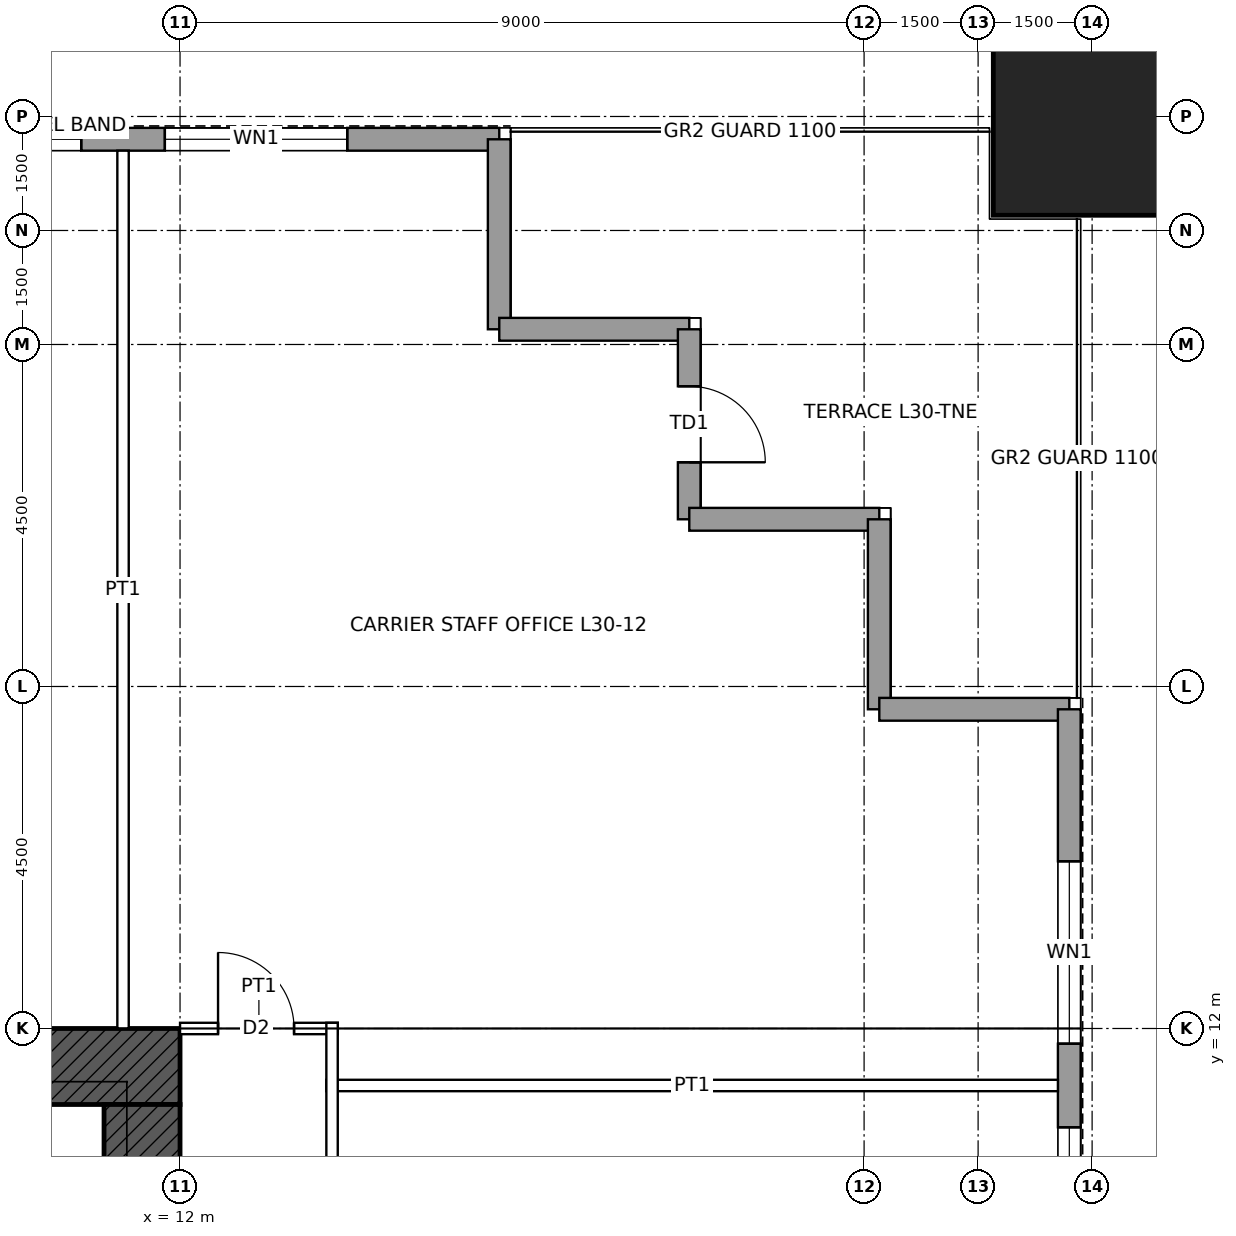
"""IFC4 building model, lengths in metres.
Left out: names, types, materials, properties, quantities, classifications, styles, units other than length and angle.
Written with IfcOpenShell. Run it as: python <this file> out.ifc"""

import sys

from ifc_helpers import new_model, si_unit, direction, frame, frame_2d, origin, origin_2d, place, context, subcontext, project, spatial, rectangle, hollow_rectangle, extrude, element, fill, save


model = new_model("IFC4")
c1 = context("Model", 3, precision=1e-05, world=origin(), true_north=direction((0.0, 1.0)))
c2 = subcontext(c1, "Body", "Model", "MODEL_VIEW")
j1 = project(units=[si_unit("LENGTHUNIT", "METRE"), si_unit("PLANEANGLEUNIT", "RADIAN")], contexts=[c1])
p1 = place(None, origin())
s1 = spatial("IfcSite", under=j1, at=p1, CompositionType="ELEMENT")
p2 = place(p1, origin())
s2 = spatial("IfcBuilding", under=s1, at=p2, CompositionType="ELEMENT")
p3 = place(p2, frame((0.0, 0.0, 149.4)))
s3 = spatial("IfcBuildingStorey", under=s2, at=p3, CompositionType="ELEMENT", Elevation=149.4)
p4 = place(p3, frame((24.0, 24.0, 0.0), z_axis=(0.0, 0.0, 1.0), x_axis=(1.0, 0.0, 0.0)))
e1 = element("IfcColumn", 1, at=p4, inside=s3, PredefinedType="COLUMN", context=c2, shape_type="SweptSolid", body=[
    extrude(hollow_rectangle(XDim=2.6, YDim=2.6, WallThickness=0.13, at=origin_2d()), origin(), (0.0, 0.0, 1.0), 4.5),
])
p5 = place(p3, frame((-12.0, 11.5, 0.0), z_axis=(0.0, 0.0, 1.0), x_axis=(1.0, 0.0, 0.0)))
e2 = element("IfcWall", 2, at=p5, inside=s3, PredefinedType="SHEAR", context=c2, shape_type="SweptSolid", body=[
    extrude(rectangle(XDim=24.0, YDim=1.0, at=frame_2d((12.0, 0.0))), origin(), (0.0, 0.0, 1.0), 4.5),
])
p6 = place(p5, frame((6.25, 0.0, 0.0)))
e3 = element("IfcOpeningElement", 3, at=p6, cuts=e2, PredefinedType="OPENING", context=c2, shape_type="SweptSolid", body=[
    extrude(rectangle(XDim=1.0, YDim=2.4, at=frame_2d((0.5, 1.2))), frame((0.0, 0.51, 0.0), z_axis=(0.0, -1.0, 0.0), x_axis=(1.0, 0.0, 0.0)), (0.0, 0.0, 1.0), 1.02),
])
p7 = place(p5, frame((16.75, 0.0, 0.0)))
e4 = element("IfcOpeningElement", 4, at=p7, cuts=e2, PredefinedType="OPENING", context=c2, shape_type="SweptSolid", body=[
    extrude(rectangle(XDim=1.0, YDim=2.4, at=frame_2d((0.5, 1.2))), frame((0.0, 0.51, 0.0), z_axis=(0.0, -1.0, 0.0), x_axis=(1.0, 0.0, 0.0)), (0.0, 0.0, 1.0), 1.02),
])
p8 = place(p3, frame((11.5, 11.0, 0.0), z_axis=(0.0, 0.0, 1.0), x_axis=(0.0, -1.0, 0.0)))
e5 = element("IfcWall", 5, at=p8, inside=s3, PredefinedType="SHEAR", context=c2, shape_type="SweptSolid", body=[
    extrude(rectangle(XDim=22.0, YDim=1.0, at=frame_2d((11.0, 0.0))), origin(), (0.0, 0.0, 1.0), 4.5),
])
p9 = place(p8, frame((10.5, 0.0, 0.0)))
e6 = element("IfcOpeningElement", 6, at=p9, cuts=e5, PredefinedType="OPENING", context=c2, shape_type="SweptSolid", body=[
    extrude(rectangle(XDim=1.0, YDim=2.4, at=frame_2d((0.5, 1.2))), frame((0.0, 0.51, 0.0), z_axis=(0.0, -1.0, 0.0), x_axis=(1.0, 0.0, 0.0)), (0.0, 0.0, 1.0), 1.02),
])
p10 = place(p3, frame((-16.2, 23.7, 0.0), z_axis=(0.0, 0.0, 1.0), x_axis=(1.0, 0.0, 0.0)))
e7 = element("IfcWall", 7, at=p10, inside=s3, PredefinedType="SOLIDWALL", context=c2, shape_type="SweptSolid", body=[
    extrude(rectangle(XDim=32.4, YDim=0.3, at=frame_2d((16.2, 0.0))), origin(), (0.0, 0.0, 1.0), 4.3),
])
p11 = place(p10, frame((2.0, 0.0, 1.0)))
e8 = element("IfcOpeningElement", 8, at=p11, cuts=e7, PredefinedType="OPENING", context=c2, shape_type="SweptSolid", body=[
    extrude(rectangle(XDim=2.4, YDim=1.2, at=frame_2d((1.2, 0.6))), frame((0.0, 0.16, 0.0), z_axis=(0.0, -1.0, 0.0), x_axis=(1.0, 0.0, 0.0)), (0.0, 0.0, 1.0), 0.32),
])
p12 = place(p10, frame((5.5, 0.0, 1.0)))
e9 = element("IfcOpeningElement", 9, at=p12, cuts=e7, PredefinedType="OPENING", context=c2, shape_type="SweptSolid", body=[
    extrude(rectangle(XDim=2.4, YDim=1.2, at=frame_2d((1.2, 0.6))), frame((0.0, 0.16, 0.0), z_axis=(0.0, -1.0, 0.0), x_axis=(1.0, 0.0, 0.0)), (0.0, 0.0, 1.0), 0.32),
])
p13 = place(p10, frame((11.8, 0.0, 1.0)))
e10 = element("IfcOpeningElement", 10, at=p13, cuts=e7, PredefinedType="OPENING", context=c2, shape_type="SweptSolid", body=[
    extrude(rectangle(XDim=1.8, YDim=1.2, at=frame_2d((0.9, 0.6))), frame((0.0, 0.16, 0.0), z_axis=(0.0, -1.0, 0.0), x_axis=(1.0, 0.0, 0.0)), (0.0, 0.0, 1.0), 0.32),
])
p14 = place(p10, frame((13.9, 0.0, 1.0)))
e11 = element("IfcOpeningElement", 11, at=p14, cuts=e7, PredefinedType="OPENING", context=c2, shape_type="SweptSolid", body=[
    extrude(rectangle(XDim=1.8, YDim=1.2, at=frame_2d((0.9, 0.6))), frame((0.0, 0.16, 0.0), z_axis=(0.0, -1.0, 0.0), x_axis=(1.0, 0.0, 0.0)), (0.0, 0.0, 1.0), 0.32),
])
p15 = place(p10, frame((16.1, 0.0, 1.0)))
e12 = element("IfcOpeningElement", 12, at=p15, cuts=e7, PredefinedType="OPENING", context=c2, shape_type="SweptSolid", body=[
    extrude(rectangle(XDim=2.4, YDim=1.2, at=frame_2d((1.2, 0.6))), frame((0.0, 0.16, 0.0), z_axis=(0.0, -1.0, 0.0), x_axis=(1.0, 0.0, 0.0)), (0.0, 0.0, 1.0), 0.32),
])
p16 = place(p10, frame((18.8, 0.0, 1.0)))
e13 = element("IfcOpeningElement", 13, at=p16, cuts=e7, PredefinedType="OPENING", context=c2, shape_type="SweptSolid", body=[
    extrude(rectangle(XDim=1.8, YDim=1.2, at=frame_2d((0.9, 0.6))), frame((0.0, 0.16, 0.0), z_axis=(0.0, -1.0, 0.0), x_axis=(1.0, 0.0, 0.0)), (0.0, 0.0, 1.0), 0.32),
])
p17 = place(p10, frame((24.5, 0.0, 1.0)))
e14 = element("IfcOpeningElement", 14, at=p17, cuts=e7, PredefinedType="OPENING", context=c2, shape_type="SweptSolid", body=[
    extrude(rectangle(XDim=2.4, YDim=1.2, at=frame_2d((1.2, 0.6))), frame((0.0, 0.16, 0.0), z_axis=(0.0, -1.0, 0.0), x_axis=(1.0, 0.0, 0.0)), (0.0, 0.0, 1.0), 0.32),
])
p18 = place(p10, frame((28.0, 0.0, 1.0)))
e15 = element("IfcOpeningElement", 15, at=p18, cuts=e7, PredefinedType="OPENING", context=c2, shape_type="SweptSolid", body=[
    extrude(rectangle(XDim=2.4, YDim=1.2, at=frame_2d((1.2, 0.6))), frame((0.0, 0.16, 0.0), z_axis=(0.0, -1.0, 0.0), x_axis=(1.0, 0.0, 0.0)), (0.0, 0.0, 1.0), 0.32),
])
for number, where, z_axis, x_axis in (
    (16, (16.2, 23.7, 0.0), (0.0, 0.0, 1.0), (0.0, -1.0, 0.0)),
    (17, (16.2, 21.2, 0.0), (0.0, 0.0, 1.0), (1.0, 0.0, 0.0)),
):
    element("IfcWall", number, at=place(p3, frame(where, z_axis=z_axis, x_axis=x_axis)), inside=s3, PredefinedType="SOLIDWALL", context=c2, shape_type="SweptSolid", body=[
        extrude(rectangle(XDim=2.5, YDim=0.3, at=frame_2d((1.25, 0.0))), origin(), (0.0, 0.0, 1.0), 4.3),
    ])
p19 = place(p3, frame((18.7, 21.2, 0.0), z_axis=(0.0, 0.0, 1.0), x_axis=(0.0, -1.0, 0.0)))
e18 = element("IfcWall", 18, at=p19, inside=s3, PredefinedType="SOLIDWALL", context=c2, shape_type="SweptSolid", body=[
    extrude(rectangle(XDim=2.5, YDim=0.3, at=frame_2d((1.25, 0.0))), origin(), (0.0, 0.0, 1.0), 4.3),
])
p20 = place(p19, frame((0.75, 0.0, 0.0)))
e19 = element("IfcOpeningElement", 19, at=p20, cuts=e18, PredefinedType="OPENING", context=c2, shape_type="SweptSolid", body=[
    extrude(rectangle(XDim=1.0, YDim=2.4, at=frame_2d((0.5, 1.2))), frame((0.0, 0.16, 0.0), z_axis=(0.0, -1.0, 0.0), x_axis=(1.0, 0.0, 0.0)), (0.0, 0.0, 1.0), 0.32),
])
for number, where, z_axis, x_axis in (
    (20, (18.7, 18.7, 0.0), (0.0, 0.0, 1.0), (1.0, 0.0, 0.0)),
    (21, (21.2, 18.7, 0.0), (0.0, 0.0, 1.0), (0.0, -1.0, 0.0)),
    (22, (21.2, 16.2, 0.0), (0.0, 0.0, 1.0), (1.0, 0.0, 0.0)),
):
    element("IfcWall", number, at=place(p3, frame(where, z_axis=z_axis, x_axis=x_axis)), inside=s3, PredefinedType="SOLIDWALL", context=c2, shape_type="SweptSolid", body=[
        extrude(rectangle(XDim=2.5, YDim=0.3, at=frame_2d((1.25, 0.0))), origin(), (0.0, 0.0, 1.0), 4.3),
    ])
p21 = place(p3, frame((23.7, 16.2, 0.0), z_axis=(0.0, 0.0, 1.0), x_axis=(0.0, -1.0, 0.0)))
e23 = element("IfcWall", 23, at=p21, inside=s3, PredefinedType="SOLIDWALL", context=c2, shape_type="SweptSolid", body=[
    extrude(rectangle(XDim=32.4, YDim=0.3, at=frame_2d((16.2, 0.0))), origin(), (0.0, 0.0, 1.0), 4.3),
])
p22 = place(p21, frame((2.0, 0.0, 1.0)))
e24 = element("IfcOpeningElement", 24, at=p22, cuts=e23, PredefinedType="OPENING", context=c2, shape_type="SweptSolid", body=[
    extrude(rectangle(XDim=2.4, YDim=1.2, at=frame_2d((1.2, 0.6))), frame((0.0, 0.16, 0.0), z_axis=(0.0, -1.0, 0.0), x_axis=(1.0, 0.0, 0.0)), (0.0, 0.0, 1.0), 0.32),
])
p23 = place(p21, frame((5.5, 0.0, 1.0)))
e25 = element("IfcOpeningElement", 25, at=p23, cuts=e23, PredefinedType="OPENING", context=c2, shape_type="SweptSolid", body=[
    extrude(rectangle(XDim=2.4, YDim=1.2, at=frame_2d((1.2, 0.6))), frame((0.0, 0.16, 0.0), z_axis=(0.0, -1.0, 0.0), x_axis=(1.0, 0.0, 0.0)), (0.0, 0.0, 1.0), 0.32),
])
p24 = place(p21, frame((11.8, 0.0, 1.0)))
e26 = element("IfcOpeningElement", 26, at=p24, cuts=e23, PredefinedType="OPENING", context=c2, shape_type="SweptSolid", body=[
    extrude(rectangle(XDim=1.8, YDim=1.2, at=frame_2d((0.9, 0.6))), frame((0.0, 0.16, 0.0), z_axis=(0.0, -1.0, 0.0), x_axis=(1.0, 0.0, 0.0)), (0.0, 0.0, 1.0), 0.32),
])
p25 = place(p21, frame((13.9, 0.0, 1.0)))
e27 = element("IfcOpeningElement", 27, at=p25, cuts=e23, PredefinedType="OPENING", context=c2, shape_type="SweptSolid", body=[
    extrude(rectangle(XDim=1.8, YDim=1.2, at=frame_2d((0.9, 0.6))), frame((0.0, 0.16, 0.0), z_axis=(0.0, -1.0, 0.0), x_axis=(1.0, 0.0, 0.0)), (0.0, 0.0, 1.0), 0.32),
])
p26 = place(p21, frame((16.1, 0.0, 1.0)))
e28 = element("IfcOpeningElement", 28, at=p26, cuts=e23, PredefinedType="OPENING", context=c2, shape_type="SweptSolid", body=[
    extrude(rectangle(XDim=2.4, YDim=1.2, at=frame_2d((1.2, 0.6))), frame((0.0, 0.16, 0.0), z_axis=(0.0, -1.0, 0.0), x_axis=(1.0, 0.0, 0.0)), (0.0, 0.0, 1.0), 0.32),
])
p27 = place(p21, frame((18.8, 0.0, 1.0)))
e29 = element("IfcOpeningElement", 29, at=p27, cuts=e23, PredefinedType="OPENING", context=c2, shape_type="SweptSolid", body=[
    extrude(rectangle(XDim=1.8, YDim=1.2, at=frame_2d((0.9, 0.6))), frame((0.0, 0.16, 0.0), z_axis=(0.0, -1.0, 0.0), x_axis=(1.0, 0.0, 0.0)), (0.0, 0.0, 1.0), 0.32),
])
p28 = place(p21, frame((24.5, 0.0, 1.0)))
e30 = element("IfcOpeningElement", 30, at=p28, cuts=e23, PredefinedType="OPENING", context=c2, shape_type="SweptSolid", body=[
    extrude(rectangle(XDim=2.4, YDim=1.2, at=frame_2d((1.2, 0.6))), frame((0.0, 0.16, 0.0), z_axis=(0.0, -1.0, 0.0), x_axis=(1.0, 0.0, 0.0)), (0.0, 0.0, 1.0), 0.32),
])
p29 = place(p21, frame((28.0, 0.0, 1.0)))
e31 = element("IfcOpeningElement", 31, at=p29, cuts=e23, PredefinedType="OPENING", context=c2, shape_type="SweptSolid", body=[
    extrude(rectangle(XDim=2.4, YDim=1.2, at=frame_2d((1.2, 0.6))), frame((0.0, 0.16, 0.0), z_axis=(0.0, -1.0, 0.0), x_axis=(1.0, 0.0, 0.0)), (0.0, 0.0, 1.0), 0.32),
])
p30 = place(p3, frame((13.925, 11.25, 0.0), z_axis=(0.0, 0.0, 1.0), x_axis=(1.0, 0.0, 0.0)))
e32 = element("IfcWall", 32, at=p30, inside=s3, PredefinedType="PARTITIONING", context=c2, shape_type="SweptSolid", body=[
    extrude(rectangle(XDim=9.625, YDim=0.15, at=frame_2d((4.812, 0.0))), origin(), (0.0, 0.0, 1.0), 3.431),
])
p31 = place(p3, frame((12.0, 12.0, 0.0), z_axis=(0.0, 0.0, 1.0), x_axis=(1.0, 0.0, 0.0)))
e33 = element("IfcWall", 33, at=p31, inside=s3, PredefinedType="PARTITIONING", context=c2, shape_type="SweptSolid", body=[
    extrude(rectangle(XDim=2.075, YDim=0.15, at=frame_2d((1.038, 0.0))), origin(), (0.0, 0.0, 1.0), 3.284),
])
p32 = place(p31, frame((0.5, 0.0, 0.0)))
e34 = element("IfcOpeningElement", 34, at=p32, cuts=e33, PredefinedType="OPENING", context=c2, shape_type="SweptSolid", body=[
    extrude(rectangle(XDim=1.0, YDim=2.1, at=frame_2d((0.5, 1.05))), frame((0.0, 0.085, 0.0), z_axis=(0.0, -1.0, 0.0), x_axis=(1.0, 0.0, 0.0)), (0.0, 0.0, 1.0), 0.17),
])
p33 = place(p3, frame((11.25, 12.0, 0.0), z_axis=(0.0, 0.0, 1.0), x_axis=(0.0, 1.0, 0.0)))
e35 = element("IfcWall", 35, at=p33, inside=s3, PredefinedType="PARTITIONING", context=c2, shape_type="SweptSolid", body=[
    extrude(rectangle(XDim=11.55, YDim=0.15, at=frame_2d((5.775, 0.0))), origin(), (0.0, 0.0, 1.0), 3.431),
])
p34 = place(p3, frame((14.0, -14.075, 0.0), z_axis=(0.0, 0.0, 1.0), x_axis=(0.0, 1.0, 0.0)))
e36 = element("IfcWall", 36, at=p34, inside=s3, PredefinedType="PARTITIONING", context=c2, shape_type="SweptSolid", body=[
    extrude(rectangle(XDim=26.15, YDim=0.15, at=frame_2d((13.075, 0.0))), origin(), (0.0, 0.0, 1.0), 4.3),
])
p35 = place(p34, frame((18.8, 0.0, 0.0)))
e37 = element("IfcOpeningElement", 37, at=p35, cuts=e36, PredefinedType="OPENING", context=c2, shape_type="SweptSolid", body=[
    extrude(rectangle(XDim=1.8, YDim=2.4, at=frame_2d((0.9, 1.2))), frame((0.0, 0.085, 0.0), z_axis=(0.0, -1.0, 0.0), x_axis=(1.0, 0.0, 0.0)), (0.0, 0.0, 1.0), 0.17),
])
p36 = place(p34, frame((7.55, 0.0, 0.0)))
e38 = element("IfcOpeningElement", 38, at=p36, cuts=e36, PredefinedType="OPENING", context=c2, shape_type="SweptSolid", body=[
    extrude(rectangle(XDim=1.8, YDim=2.4, at=frame_2d((0.9, 1.2))), frame((0.0, 0.085, 0.0), z_axis=(0.0, -1.0, 0.0), x_axis=(1.0, 0.0, 0.0)), (0.0, 0.0, 1.0), 0.17),
])
p37 = place(p17, origin())
e39 = element("IfcWindow", 39, at=p37, inside=s3, PartitioningType="SINGLE_PANEL", PredefinedType="WINDOW", context=c2, shape_type="SweptSolid", body=[
    extrude(rectangle(XDim=2.4, YDim=1.2, at=frame_2d((1.2, 0.6))), frame((0.0, 0.03, 0.0), z_axis=(0.0, -1.0, 0.0), x_axis=(1.0, 0.0, 0.0)), (0.0, 0.0, 1.0), 0.06),
])
fill(e14, e39)
p38 = place(p18, origin())
e40 = element("IfcWindow", 40, at=p38, inside=s3, PartitioningType="SINGLE_PANEL", PredefinedType="WINDOW", context=c2, shape_type="SweptSolid", body=[
    extrude(rectangle(XDim=2.4, YDim=1.2, at=frame_2d((1.2, 0.6))), frame((0.0, 0.03, 0.0), z_axis=(0.0, -1.0, 0.0), x_axis=(1.0, 0.0, 0.0)), (0.0, 0.0, 1.0), 0.06),
])
fill(e15, e40)
p39 = place(p20, origin())
e41 = element("IfcDoor", 41, at=p39, inside=s3, OperationType="SINGLE_SWING_RIGHT", PredefinedType="DOOR", context=c2, shape_type="SweptSolid", body=[
    extrude(rectangle(XDim=1.0, YDim=2.4, at=frame_2d((0.5, 1.2))), frame((0.0, 0.025, 0.0), z_axis=(0.0, -1.0, 0.0), x_axis=(1.0, 0.0, 0.0)), (0.0, 0.0, 1.0), 0.05),
])
fill(e19, e41)
p40 = place(p22, origin())
e42 = element("IfcWindow", 42, at=p40, inside=s3, PartitioningType="SINGLE_PANEL", PredefinedType="WINDOW", context=c2, shape_type="SweptSolid", body=[
    extrude(rectangle(XDim=2.4, YDim=1.2, at=frame_2d((1.2, 0.6))), frame((0.0, 0.03, 0.0), z_axis=(0.0, -1.0, 0.0), x_axis=(1.0, 0.0, 0.0)), (0.0, 0.0, 1.0), 0.06),
])
fill(e24, e42)
p41 = place(p23, origin())
e43 = element("IfcWindow", 43, at=p41, inside=s3, PartitioningType="SINGLE_PANEL", PredefinedType="WINDOW", context=c2, shape_type="SweptSolid", body=[
    extrude(rectangle(XDim=2.4, YDim=1.2, at=frame_2d((1.2, 0.6))), frame((0.0, 0.03, 0.0), z_axis=(0.0, -1.0, 0.0), x_axis=(1.0, 0.0, 0.0)), (0.0, 0.0, 1.0), 0.06),
])
fill(e25, e43)
p42 = place(p32, origin())
e44 = element("IfcDoor", 44, at=p42, inside=s3, OperationType="SINGLE_SWING_LEFT", PredefinedType="DOOR", context=c2, shape_type="SweptSolid", body=[
    extrude(rectangle(XDim=1.0, YDim=2.1, at=frame_2d((0.5, 1.05))), frame((0.0, 0.025, 0.0), z_axis=(0.0, -1.0, 0.0), x_axis=(1.0, 0.0, 0.0)), (0.0, 0.0, 1.0), 0.05),
])
fill(e34, e44)
save(model, sys.argv[1])
